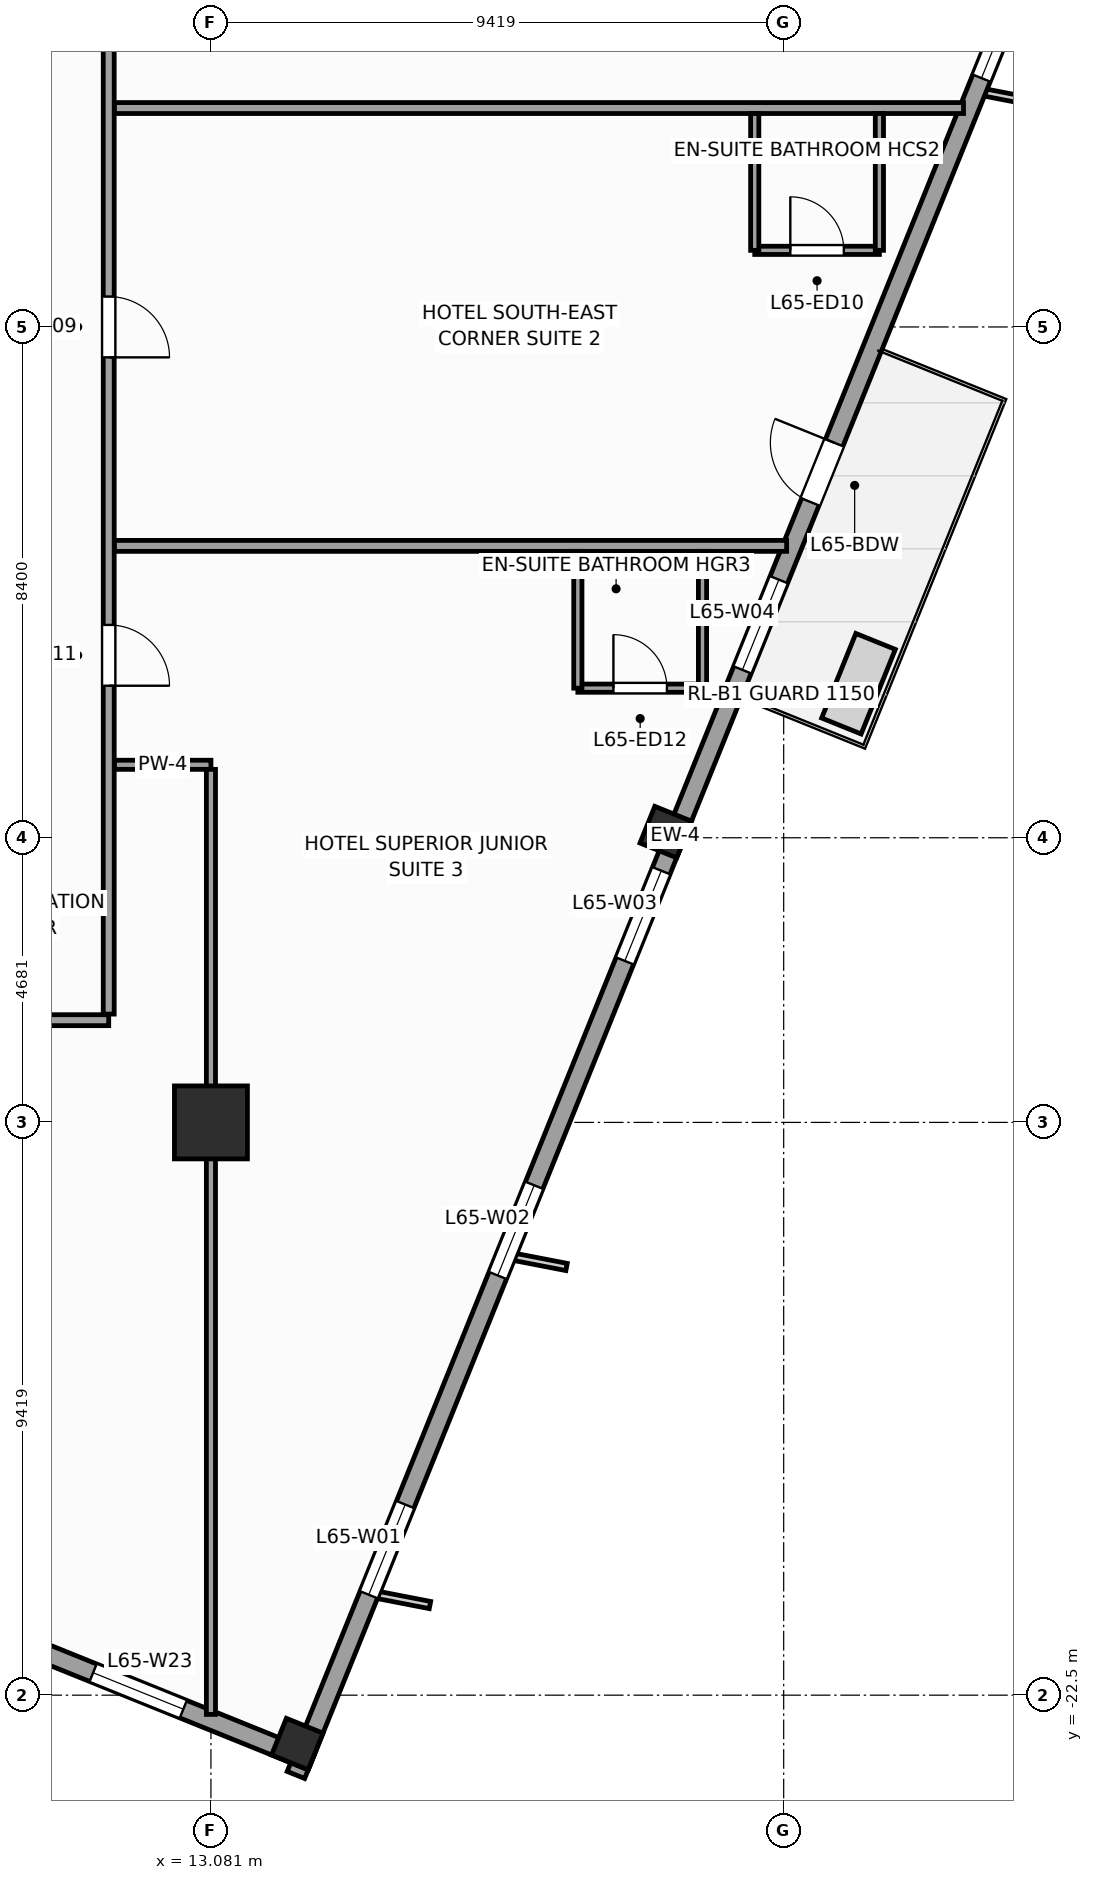
"""IFC4 building model, lengths in metres.
Left out: names, types, materials, properties, quantities, classifications, styles, units other than length and angle.
Written with IfcOpenShell. Run it as: python <this file> out.ifc"""

import sys

from ifc_helpers import new_model, si_unit, direction, frame, frame_2d, origin, origin_2d, place, context, subcontext, project, spatial, rectangle, extrude, source, transform, mapped, element, fill, save


model = new_model("IFC4")
c1 = context("Model", 3, precision=1e-05, world=origin(), true_north=direction((0.0, 1.0)))
c2 = subcontext(c1, "Body", "Model", "MODEL_VIEW")
j1 = project(units=[si_unit("LENGTHUNIT", "METRE"), si_unit("PLANEANGLEUNIT", "RADIAN")], contexts=[c1])
p1 = place(None, origin())
s1 = spatial("IfcSite", under=j1, at=p1, CompositionType="ELEMENT")
p2 = place(p1, origin())
s2 = spatial("IfcBuilding", under=s1, at=p2, CompositionType="ELEMENT")
p3 = place(p2, frame((0.0, 0.0, 268.8)))
s3 = spatial("IfcBuildingStorey", under=s2, at=p3, CompositionType="ELEMENT", Elevation=268.8)
m1 = source(origin(), c2, "Body", "SweptSolid", [
    extrude(rectangle(XDim=1.2, YDim=1.2, at=origin_2d()), origin(), (0.0, 0.0, 1.0), 3.6),
])
p4 = place(p3, frame((13.081, -13.081, 0.0), z_axis=(0.0, 0.0, 1.0), x_axis=(1.0, 0.0, 0.0)))
e1 = element("IfcColumn", 1, at=p4, inside=s3, PredefinedType="COLUMN", context=c2, shape_type="MappedRepresentation", body=[
    mapped(m1, transform((0.0, 0.0, 0.0), scale=1.0)),
])
m2 = source(origin(), c2, "Body", "SweptSolid", [
    extrude(rectangle(XDim=0.65, YDim=0.65, at=origin_2d()), origin(), (0.0, 0.0, 1.0), 3.6),
])
for number, where, z_axis, x_axis in (
    (2, (14.501, -23.304, 0.0), (0.0, 0.0, 1.0), (0.375, 0.927, 0.0)),
    (3, (20.56, -8.307, 0.0), (0.0, 0.0, 1.0), (0.375, 0.927, 0.0)),
):
    element("IfcColumn", number, at=place(p3, frame(where, z_axis=z_axis, x_axis=x_axis)), inside=s3, PredefinedType="COLUMN", context=c2, shape_type="MappedRepresentation", body=[
        mapped(m2, transform((0.0, 0.0, 0.0), scale=1.0)),
    ])
p5 = place(p3, frame((14.479, -23.813, 0.0), z_axis=(0.0, 0.0, 1.0), x_axis=(0.374609557019, 0.927182657188, 0.0)))
e4 = element("IfcWall", 4, at=p5, inside=s3, PredefinedType="STANDARD", context=c2, shape_type="SweptSolid", body=[
    extrude(rectangle(XDim=33.31, YDim=0.31, at=frame_2d((16.655, 0.0))), origin(), (0.0, 0.0, 1.0), 2.75),
])
p6 = place(p5, frame((22.58, 0.0, 0.0)))
e5 = element("IfcOpeningElement", 5, at=p6, cuts=e4, PredefinedType="OPENING", context=c2, shape_type="SweptSolid", body=[
    extrude(rectangle(XDim=1.05, YDim=2.25, at=frame_2d((0.525, 1.125))), frame((0.0, 0.165, 0.0), z_axis=(0.0, -1.0, 0.0), x_axis=(1.0, 0.0, 0.0)), (0.0, 0.0, 1.0), 0.33),
])
p7 = place(p5, frame((3.197, 0.0, 0.47)))
e6 = element("IfcOpeningElement", 6, at=p7, cuts=e4, PredefinedType="OPENING", context=c2, shape_type="SweptSolid", body=[
    extrude(rectangle(XDim=1.6, YDim=2.1, at=frame_2d((0.8, 1.05))), frame((0.0, 0.165, 0.0), z_axis=(0.0, -1.0, 0.0), x_axis=(1.0, 0.0, 0.0)), (0.0, 0.0, 1.0), 0.33),
])
p8 = place(p5, frame((8.86, 0.0, 0.47)))
e7 = element("IfcOpeningElement", 7, at=p8, cuts=e4, PredefinedType="OPENING", context=c2, shape_type="SweptSolid", body=[
    extrude(rectangle(XDim=1.6, YDim=2.1, at=frame_2d((0.8, 1.05))), frame((0.0, 0.165, 0.0), z_axis=(0.0, -1.0, 0.0), x_axis=(1.0, 0.0, 0.0)), (0.0, 0.0, 1.0), 0.33),
])
p9 = place(p5, frame((14.439, 0.0, 0.47)))
e8 = element("IfcOpeningElement", 8, at=p9, cuts=e4, PredefinedType="OPENING", context=c2, shape_type="SweptSolid", body=[
    extrude(rectangle(XDim=1.6, YDim=2.1, at=frame_2d((0.8, 1.05))), frame((0.0, 0.165, 0.0), z_axis=(0.0, -1.0, 0.0), x_axis=(1.0, 0.0, 0.0)), (0.0, 0.0, 1.0), 0.33),
])
p10 = place(p5, frame((19.601, 0.0, 0.47)))
e9 = element("IfcOpeningElement", 9, at=p10, cuts=e4, PredefinedType="OPENING", context=c2, shape_type="SweptSolid", body=[
    extrude(rectangle(XDim=1.6, YDim=2.1, at=frame_2d((0.8, 1.05))), frame((0.0, 0.165, 0.0), z_axis=(0.0, -1.0, 0.0), x_axis=(1.0, 0.0, 0.0)), (0.0, 0.0, 1.0), 0.33),
])
p11 = place(p5, frame((30.097, 0.0, 0.47)))
e10 = element("IfcOpeningElement", 10, at=p11, cuts=e4, PredefinedType="OPENING", context=c2, shape_type="SweptSolid", body=[
    extrude(rectangle(XDim=1.6, YDim=2.1, at=frame_2d((0.8, 1.05))), frame((0.0, 0.165, 0.0), z_axis=(0.0, -1.0, 0.0), x_axis=(1.0, 0.0, 0.0)), (0.0, 0.0, 1.0), 0.33),
])
p12 = place(p3, frame((9.032, -21.278, 0.0), z_axis=(0.0, 0.0, 1.0), x_axis=(0.927185411764, -0.374602739196, 0.0)))
e11 = element("IfcWall", 11, at=p12, inside=s3, PredefinedType="STANDARD", context=c2, shape_type="SweptSolid", body=[
    extrude(rectangle(XDim=6.155, YDim=0.31, at=frame_2d((3.078, 0.0))), origin(), (0.0, 0.0, 1.0), 3.35),
])
p13 = place(p12, frame((2.278, 0.0, 0.47)))
e12 = element("IfcOpeningElement", 12, at=p13, cuts=e11, PredefinedType="OPENING", context=c2, shape_type="SweptSolid", body=[
    extrude(rectangle(XDim=1.6, YDim=2.1, at=frame_2d((0.8, 1.05))), frame((0.0, 0.165, 0.0), z_axis=(0.0, -1.0, 0.0), x_axis=(1.0, 0.0, 0.0)), (0.0, 0.0, 1.0), 0.33),
])
p14 = place(p3, frame((-10.3, -11.4, 0.0), z_axis=(0.0, 0.0, 1.0), x_axis=(1.0, 0.0, 0.0)))
e13 = element("IfcWall", 13, at=p14, inside=s3, PredefinedType="PARTITIONING", context=c2, shape_type="SweptSolid", body=[
    extrude(rectangle(XDim=21.7, YDim=0.18, at=frame_2d((10.85, 0.0))), origin(), (0.0, 0.0, 1.0), 3.35),
])
p15 = place(p14, frame((1.605, 0.0, 0.0)))
e14 = element("IfcOpeningElement", 14, at=p15, cuts=e13, PredefinedType="OPENING", context=c2, shape_type="SweptSolid", body=[
    extrude(rectangle(XDim=0.95, YDim=2.1, at=frame_2d((0.475, 1.05))), frame((0.0, 0.1, 0.0), z_axis=(0.0, -1.0, 0.0), x_axis=(1.0, 0.0, 0.0)), (0.0, 0.0, 1.0), 0.2),
])
p16 = place(p14, frame((17.236, 0.0, 0.0)))
e15 = element("IfcOpeningElement", 15, at=p16, cuts=e13, PredefinedType="OPENING", context=c2, shape_type="SweptSolid", body=[
    extrude(rectangle(XDim=1.0, YDim=2.15, at=frame_2d((0.5, 1.075))), frame((0.0, 0.1, 0.0), z_axis=(0.0, -1.0, 0.0), x_axis=(1.0, 0.0, 0.0)), (0.0, 0.0, 1.0), 0.2),
])
p17 = place(p14, frame((9.8, 0.0, 0.0)))
e16 = element("IfcOpeningElement", 16, at=p17, cuts=e13, PredefinedType="OPENING", context=c2, shape_type="SweptSolid", body=[
    extrude(rectangle(XDim=1.0, YDim=2.15, at=frame_2d((0.5, 1.075))), frame((0.0, 0.1, 0.0), z_axis=(0.0, -1.0, 0.0), x_axis=(1.0, 0.0, 0.0)), (0.0, 0.0, 1.0), 0.2),
])
p18 = place(p3, frame((11.4, -11.3, 0.0), z_axis=(0.0, 0.0, 1.0), x_axis=(0.0, 1.0, 0.0)))
e17 = element("IfcWall", 17, at=p18, inside=s3, PredefinedType="PARTITIONING", context=c2, shape_type="SweptSolid", body=[
    extrude(rectangle(XDim=21.5, YDim=0.18, at=frame_2d((10.75, 0.0))), origin(), (0.0, 0.0, 1.0), 3.35),
])
p19 = place(p18, frame((17.536, 0.0, 0.0)))
e18 = element("IfcOpeningElement", 18, at=p19, cuts=e17, PredefinedType="OPENING", context=c2, shape_type="SweptSolid", body=[
    extrude(rectangle(XDim=1.0, YDim=2.15, at=frame_2d((0.5, 1.075))), frame((0.0, 0.1, 0.0), z_axis=(0.0, -1.0, 0.0), x_axis=(1.0, 0.0, 0.0)), (0.0, 0.0, 1.0), 0.2),
])
p20 = place(p18, frame((10.8, 0.0, 0.0)))
e19 = element("IfcOpeningElement", 19, at=p20, cuts=e17, PredefinedType="OPENING", context=c2, shape_type="SweptSolid", body=[
    extrude(rectangle(XDim=1.0, YDim=2.15, at=frame_2d((0.5, 1.075))), frame((0.0, 0.1, 0.0), z_axis=(0.0, -1.0, 0.0), x_axis=(1.0, 0.0, 0.0)), (0.0, 0.0, 1.0), 0.2),
])
p21 = place(p18, frame((5.4, 0.0, 0.0)))
e20 = element("IfcOpeningElement", 20, at=p21, cuts=e17, PredefinedType="OPENING", context=c2, shape_type="SweptSolid", body=[
    extrude(rectangle(XDim=1.0, YDim=2.15, at=frame_2d((0.5, 1.075))), frame((0.0, 0.1, 0.0), z_axis=(0.0, -1.0, 0.0), x_axis=(1.0, 0.0, 0.0)), (0.0, 0.0, 1.0), 0.2),
])
p22 = place(p3, frame((11.495, 3.6, 0.0), z_axis=(0.0, 0.0, 1.0), x_axis=(1.0, 0.0, 0.0)))
e21 = element("IfcWall", 21, at=p22, inside=s3, PredefinedType="PARTITIONING", context=c2, shape_type="SweptSolid", body=[
    extrude(rectangle(XDim=13.962, YDim=0.18, at=frame_2d((6.981, 0.0))), origin(), (0.0, 0.0, 1.0), 3.35),
])
p23 = place(p3, frame((11.495, -3.6, 0.0), z_axis=(0.0, 0.0, 1.0), x_axis=(1.0, 0.0, 0.0)))
e22 = element("IfcWall", 22, at=p23, inside=s3, PredefinedType="PARTITIONING", context=c2, shape_type="SweptSolid", body=[
    extrude(rectangle(XDim=11.053, YDim=0.18, at=frame_2d((5.527, 0.0))), origin(), (0.0, 0.0, 1.0), 3.35),
])
p24 = place(p3, frame((11.495, -7.2, 0.0), z_axis=(0.0, 0.0, 1.0), x_axis=(1.0, 0.0, 0.0)))
e23 = element("IfcWall", 23, at=p24, inside=s3, PredefinedType="PARTITIONING", context=c2, shape_type="SweptSolid", body=[
    extrude(rectangle(XDim=1.586, YDim=0.15, at=frame_2d((0.793, 0.0))), origin(), (0.0, 0.0, 1.0), 3.35),
])
p25 = place(p3, frame((13.081, -7.275, 0.0), z_axis=(0.0, 0.0, 1.0), x_axis=(0.0, -1.0, 0.0)))
e24 = element("IfcWall", 24, at=p25, inside=s3, PredefinedType="PARTITIONING", context=c2, shape_type="SweptSolid", body=[
    extrude(rectangle(XDim=15.542, YDim=0.15, at=frame_2d((7.771, 0.0))), origin(), (0.0, 0.0, 1.0), 2.45),
])
p26 = place(p3, frame((22.024, 1.26, 0.0), z_axis=(0.0, 0.0, 1.0), x_axis=(1.0, 0.0, 0.0)))
e25 = element("IfcWall", 25, at=p26, inside=s3, PredefinedType="PARTITIONING", context=c2, shape_type="SweptSolid", body=[
    extrude(rectangle(XDim=2.05, YDim=0.135, at=frame_2d((1.025, 0.0))), origin(), (0.0, 0.0, 1.0), 3.35),
])
p27 = place(p26, frame((0.585, 0.0, 0.0)))
e26 = element("IfcOpeningElement", 26, at=p27, cuts=e25, PredefinedType="OPENING", context=c2, shape_type="SweptSolid", body=[
    extrude(rectangle(XDim=0.88, YDim=2.1, at=frame_2d((0.44, 1.05))), frame((0.0, 0.078, 0.0), z_axis=(0.0, -1.0, 0.0), x_axis=(1.0, 0.0, 0.0)), (0.0, 0.0, 1.0), 0.155),
])
for number, where, z_axis, x_axis in (
    (27, (24.074, 1.26, 0.0), (0.0, 0.0, 1.0), (0.0, 1.0, 0.0)),
    (28, (22.024, 1.26, 0.0), (0.0, 0.0, 1.0), (0.0, 1.0, 0.0)),
):
    element("IfcWall", number, at=place(p3, frame(where, z_axis=z_axis, x_axis=x_axis)), inside=s3, PredefinedType="PARTITIONING", context=c2, shape_type="SweptSolid", body=[
        extrude(rectangle(XDim=2.25, YDim=0.135, at=frame_2d((1.125, 0.0))), origin(), (0.0, 0.0, 1.0), 3.35),
    ])
p28 = place(p3, frame((19.115, -5.94, 0.0), z_axis=(0.0, 0.0, 1.0), x_axis=(1.0, 0.0, 0.0)))
e29 = element("IfcWall", 29, at=p28, inside=s3, PredefinedType="PARTITIONING", context=c2, shape_type="SweptSolid", body=[
    extrude(rectangle(XDim=2.05, YDim=0.135, at=frame_2d((1.025, 0.0))), origin(), (0.0, 0.0, 1.0), 3.35),
])
p29 = place(p28, frame((0.585, 0.0, 0.0)))
e30 = element("IfcOpeningElement", 30, at=p29, cuts=e29, PredefinedType="OPENING", context=c2, shape_type="SweptSolid", body=[
    extrude(rectangle(XDim=0.88, YDim=2.1, at=frame_2d((0.44, 1.05))), frame((0.0, 0.078, 0.0), z_axis=(0.0, -1.0, 0.0), x_axis=(1.0, 0.0, 0.0)), (0.0, 0.0, 1.0), 0.155),
])
for number, where, z_axis, x_axis in (
    (31, (21.165, -5.94, 0.0), (0.0, 0.0, 1.0), (0.0, 1.0, 0.0)),
    (32, (19.115, -5.94, 0.0), (0.0, 0.0, 1.0), (0.0, 1.0, 0.0)),
):
    element("IfcWall", number, at=place(p3, frame(where, z_axis=z_axis, x_axis=x_axis)), inside=s3, PredefinedType="PARTITIONING", context=c2, shape_type="SweptSolid", body=[
        extrude(rectangle(XDim=2.25, YDim=0.135, at=frame_2d((1.125, 0.0))), origin(), (0.0, 0.0, 1.0), 3.35),
    ])
m3 = source(origin(), c2, "Body", "SweptSolid", [
    extrude(rectangle(XDim=1.05, YDim=2.25, at=frame_2d((0.525, 1.125))), frame((0.0, 0.025, 0.0), z_axis=(0.0, -1.0, 0.0), x_axis=(1.0, 0.0, 0.0)), (0.0, 0.0, 1.0), 0.05),
])
p30 = place(p6, origin())
e33 = element("IfcDoor", 33, at=p30, inside=s3, OperationType="SINGLE_SWING_RIGHT", PredefinedType="DOOR", context=c2, shape_type="MappedRepresentation", body=[
    mapped(m3, transform((0.0, 0.0, 0.0), scale=1.0)),
])
fill(e5, e33)
m4 = source(origin(), c2, "Body", "SweptSolid", [
    extrude(rectangle(XDim=1.6, YDim=2.1, at=frame_2d((0.8, 1.05))), frame((0.0, 0.03, 0.0), z_axis=(0.0, -1.0, 0.0), x_axis=(1.0, 0.0, 0.0)), (0.0, 0.0, 1.0), 0.06),
])
p31 = place(p7, origin())
e34 = element("IfcWindow", 34, at=p31, inside=s3, PartitioningType="SINGLE_PANEL", PredefinedType="WINDOW", context=c2, shape_type="MappedRepresentation", body=[
    mapped(m4, transform((0.0, 0.0, 0.0), scale=1.0)),
])
fill(e6, e34)
p32 = place(p8, origin())
e35 = element("IfcWindow", 35, at=p32, inside=s3, PartitioningType="SINGLE_PANEL", PredefinedType="WINDOW", context=c2, shape_type="MappedRepresentation", body=[
    mapped(m4, transform((0.0, 0.0, 0.0), scale=1.0)),
])
fill(e7, e35)
p33 = place(p9, origin())
e36 = element("IfcWindow", 36, at=p33, inside=s3, PartitioningType="SINGLE_PANEL", PredefinedType="WINDOW", context=c2, shape_type="MappedRepresentation", body=[
    mapped(m4, transform((0.0, 0.0, 0.0), scale=1.0)),
])
fill(e8, e36)
p34 = place(p10, origin())
e37 = element("IfcWindow", 37, at=p34, inside=s3, PartitioningType="SINGLE_PANEL", PredefinedType="WINDOW", context=c2, shape_type="MappedRepresentation", body=[
    mapped(m4, transform((0.0, 0.0, 0.0), scale=1.0)),
])
fill(e9, e37)
p35 = place(p11, origin())
e38 = element("IfcWindow", 38, at=p35, inside=s3, PartitioningType="SINGLE_PANEL", PredefinedType="WINDOW", context=c2, shape_type="MappedRepresentation", body=[
    mapped(m4, transform((0.0, 0.0, 0.0), scale=1.0)),
])
fill(e10, e38)
p36 = place(p13, origin())
e39 = element("IfcWindow", 39, at=p36, inside=s3, PartitioningType="SINGLE_PANEL", PredefinedType="WINDOW", context=c2, shape_type="MappedRepresentation", body=[
    mapped(m4, transform((0.0, 0.0, 0.0), scale=1.0)),
])
fill(e12, e39)
m5 = source(origin(), c2, "Body", "SweptSolid", [
    extrude(rectangle(XDim=1.0, YDim=2.15, at=frame_2d((0.5, 1.075))), frame((0.0, 0.025, 0.0), z_axis=(0.0, -1.0, 0.0), x_axis=(1.0, 0.0, 0.0)), (0.0, 0.0, 1.0), 0.05),
])
p37 = place(p20, frame((1.0, 0.0, 0.0), z_axis=(0.0, 0.0, 1.0), x_axis=(-1.0, 0.0, 0.0)))
e40 = element("IfcDoor", 40, at=p37, inside=s3, OperationType="SINGLE_SWING_LEFT", PredefinedType="DOOR", context=c2, shape_type="MappedRepresentation", body=[
    mapped(m5, transform((0.0, 0.0, 0.0), scale=1.0)),
])
fill(e19, e40)
m6 = source(origin(), c2, "Body", "SweptSolid", [
    extrude(rectangle(XDim=0.88, YDim=2.1, at=frame_2d((0.44, 1.05))), frame((0.0, 0.025, 0.0), z_axis=(0.0, -1.0, 0.0), x_axis=(1.0, 0.0, 0.0)), (0.0, 0.0, 1.0), 0.05),
])
p38 = place(p27, origin())
e41 = element("IfcDoor", 41, at=p38, inside=s3, OperationType="SINGLE_SWING_LEFT", PredefinedType="DOOR", context=c2, shape_type="MappedRepresentation", body=[
    mapped(m6, transform((0.0, 0.0, 0.0), scale=1.0)),
])
fill(e26, e41)
p39 = place(p21, frame((1.0, 0.0, 0.0), z_axis=(0.0, 0.0, 1.0), x_axis=(-1.0, 0.0, 0.0)))
e42 = element("IfcDoor", 42, at=p39, inside=s3, OperationType="SINGLE_SWING_LEFT", PredefinedType="DOOR", context=c2, shape_type="MappedRepresentation", body=[
    mapped(m5, transform((0.0, 0.0, 0.0), scale=1.0)),
])
fill(e20, e42)
p40 = place(p29, origin())
e43 = element("IfcDoor", 43, at=p40, inside=s3, OperationType="SINGLE_SWING_LEFT", PredefinedType="DOOR", context=c2, shape_type="MappedRepresentation", body=[
    mapped(m6, transform((0.0, 0.0, 0.0), scale=1.0)),
])
fill(e30, e43)
save(model, sys.argv[1])
